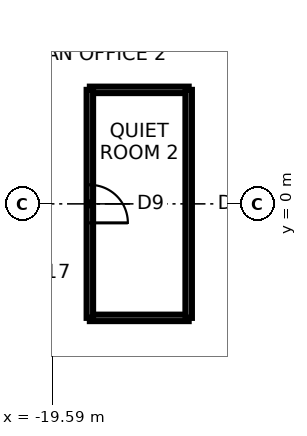
"""IFC4 building model, lengths in metres.
Left out: names, types, materials, properties, quantities, classifications, styles, units other than length and angle.
Written with IfcOpenShell. Run it as: python <this file> out.ifc"""

import sys

from ifc_helpers import new_model, si_unit, direction, frame, frame_2d, origin, place, context, subcontext, project, spatial, rectangle, extrude, element, fill, save


model = new_model("IFC4")
c1 = context("Model", 3, precision=1e-05, world=origin(), true_north=direction((0.0, 1.0)))
c2 = subcontext(c1, "Body", "Model", "MODEL_VIEW")
j1 = project(units=[si_unit("LENGTHUNIT", "METRE"), si_unit("PLANEANGLEUNIT", "RADIAN")], contexts=[c1])
p1 = place(None, origin())
s1 = spatial("IfcSite", under=j1, at=p1, CompositionType="ELEMENT")
p2 = place(p1, origin())
s2 = spatial("IfcBuilding", under=s1, at=p2, CompositionType="ELEMENT")
p3 = place(p2, frame((0.0, 0.0, 207.2)))
s3 = spatial("IfcBuildingStorey", under=s2, at=p3, CompositionType="ELEMENT", Elevation=207.2)
for number, where, z_axis, x_axis in (
    (1, (-16.0, -3.0, 0.0), (0.0, 0.0, 1.0), (-1.0, 0.0, 0.0)),
    (2, (-18.6, 3.0, 0.0), (0.0, 0.0, 1.0), (1.0, 0.0, 0.0)),
):
    element("IfcWall", number, at=place(p3, frame(where, z_axis=z_axis, x_axis=x_axis)), inside=s3, PredefinedType="PARTITIONING", context=c2, shape_type="SweptSolid", body=[
        extrude(rectangle(XDim=2.6, YDim=0.17, at=frame_2d((1.3, 0.0))), origin(), (0.0, 0.0, 1.0), 3.74),
    ])
p4 = place(p3, frame((-18.6, -3.0, 0.0), z_axis=(0.0, 0.0, 1.0), x_axis=(0.0, 1.0, 0.0)))
e3 = element("IfcWall", 3, at=p4, inside=s3, PredefinedType="PARTITIONING", context=c2, shape_type="SweptSolid", body=[
    extrude(rectangle(XDim=6.0, YDim=0.17, at=frame_2d((3.0, 0.0))), origin(), (0.0, 0.0, 1.0), 3.74),
])
p5 = place(p4, frame((2.5, 0.0, 0.0)))
e4 = element("IfcOpeningElement", 4, at=p5, cuts=e3, PredefinedType="OPENING", context=c2, shape_type="SweptSolid", body=[
    extrude(rectangle(XDim=1.0, YDim=2.4, at=frame_2d((0.5, 1.2))), frame((0.0, 0.095, 0.0), z_axis=(0.0, -1.0, 0.0), x_axis=(1.0, 0.0, 0.0)), (0.0, 0.0, 1.0), 0.19),
])
p6 = place(p3, frame((-16.0, 3.0, 0.0), z_axis=(0.0, 0.0, 1.0), x_axis=(0.0, -1.0, 0.0)))
e5 = element("IfcWall", 5, at=p6, inside=s3, PredefinedType="PARTITIONING", context=c2, shape_type="SweptSolid", body=[
    extrude(rectangle(XDim=6.0, YDim=0.17, at=frame_2d((3.0, 0.0))), origin(), (0.0, 0.0, 1.0), 3.74),
])
p7 = place(p5, frame((1.0, 0.0, 0.0), z_axis=(0.0, 0.0, 1.0), x_axis=(-1.0, 0.0, 0.0)))
e6 = element("IfcDoor", 6, at=p7, inside=s3, OperationType="SINGLE_SWING_RIGHT", PredefinedType="DOOR", context=c2, shape_type="SweptSolid", body=[
    extrude(rectangle(XDim=1.0, YDim=2.4, at=frame_2d((0.5, 1.2))), frame((0.0, 0.025, 0.0), z_axis=(0.0, -1.0, 0.0), x_axis=(1.0, 0.0, 0.0)), (0.0, 0.0, 1.0), 0.05),
])
fill(e4, e6)
save(model, sys.argv[1])
